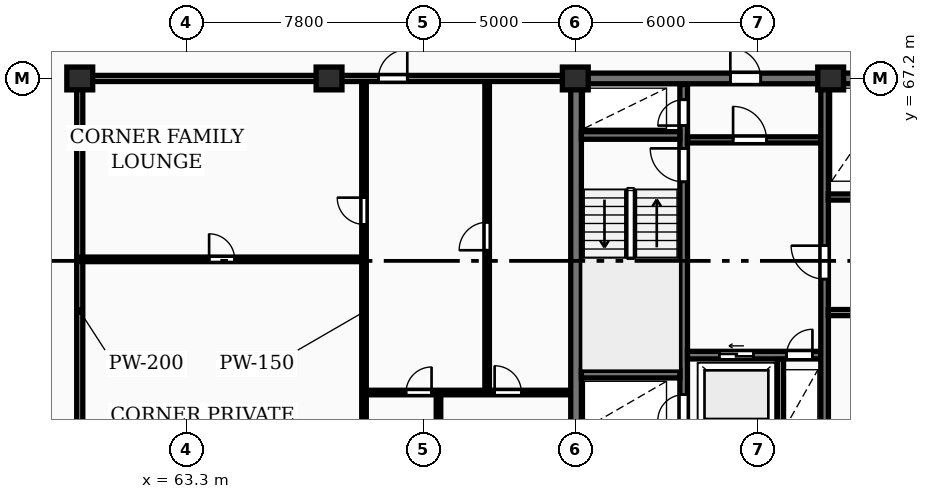
"""IFC4 building model, lengths in metres.
Left out: names, types, materials, properties, quantities, classifications, styles, units other than length and angle.
Written with IfcOpenShell. Run it as: python <this file> out.ifc"""

import sys

from ifc_helpers import new_model, si_unit, direction, frame, frame_2d, origin, origin_2d, place, context, subcontext, project, spatial, rectangle, extrude, element, fill, save


model = new_model("IFC4")
c1 = context("Model", 3, precision=1e-05, world=origin(), true_north=direction((0.0, 1.0)))
c2 = subcontext(c1, "Body", "Model", "MODEL_VIEW")
j1 = project(units=[si_unit("LENGTHUNIT", "METRE"), si_unit("PLANEANGLEUNIT", "RADIAN")], contexts=[c1])
p1 = place(None, origin())
s1 = spatial("IfcSite", under=j1, at=p1, CompositionType="ELEMENT")
p2 = place(p1, origin())
s2 = spatial("IfcBuilding", under=s1, at=p2, CompositionType="ELEMENT")
p3 = place(p2, frame((0.0, 0.0, 207.6)))
s3 = spatial("IfcBuildingStorey", under=s2, at=p3, CompositionType="ELEMENT", Elevation=207.6)
for number, where, z_axis, x_axis in (
    (1, (59.8, 67.2, 0.0), (0.0, 0.0, 1.0), (1.0, 0.0, 0.0)),
    (2, (68.0, 67.2, 0.0), (0.0, 0.0, 1.0), (1.0, 0.0, 0.0)),
    (3, (76.1, 67.2, 0.0), (0.0, 0.0, 1.0), (1.0, 0.0, 0.0)),
    (4, (84.5, 67.2, 0.0), (0.0, 0.0, 1.0), (1.0, 0.0, 0.0)),
):
    element("IfcColumn", number, at=place(p3, frame(where, z_axis=z_axis, x_axis=x_axis)), inside=s3, PredefinedType="COLUMN", context=c2, shape_type="SweptSolid", body=[
        extrude(rectangle(XDim=0.85, YDim=0.75, at=origin_2d()), origin(), (0.0, 0.0, 1.0), 3.25),
    ])
p4 = place(p3, frame((76.125, 55.375, 0.0), z_axis=(0.0, 0.0, 1.0), x_axis=(0.0, 1.0, 0.0)))
e5 = element("IfcWall", 5, at=p4, inside=s3, PredefinedType="SHEAR", context=c2, shape_type="SweptSolid", body=[
    extrude(rectangle(XDim=11.65, YDim=0.35, at=frame_2d((5.825, 0.0))), origin(), (0.0, 0.0, 1.0), 3.25),
])
p5 = place(p3, frame((75.95, 67.2, 0.0), z_axis=(0.0, 0.0, 1.0), x_axis=(1.0, 0.0, 0.0)))
e6 = element("IfcWall", 6, at=p5, inside=s3, PredefinedType="SHEAR", context=c2, shape_type="SweptSolid", body=[
    extrude(rectangle(XDim=36.3, YDim=0.35, at=frame_2d((18.15, 0.0))), origin(), (0.0, 0.0, 1.0), 3.25),
])
p6 = place(p5, frame((5.25, 0.0, 0.0)))
e7 = element("IfcOpeningElement", 7, at=p6, cuts=e6, PredefinedType="OPENING", context=c2, shape_type="SweptSolid", body=[
    extrude(rectangle(XDim=1.0, YDim=2.15, at=frame_2d((0.5, 1.075))), frame((0.0, 0.185, 0.0), z_axis=(0.0, -1.0, 0.0), x_axis=(1.0, 0.0, 0.0)), (0.0, 0.0, 1.0), 0.37),
])
p7 = place(p5, frame((21.6, 0.0, 0.0)))
e8 = element("IfcOpeningElement", 8, at=p7, cuts=e6, PredefinedType="OPENING", context=c2, shape_type="SweptSolid", body=[
    extrude(rectangle(XDim=1.5, YDim=2.2, at=frame_2d((0.75, 1.1))), frame((0.0, 0.185, 0.0), z_axis=(0.0, -1.0, 0.0), x_axis=(1.0, 0.0, 0.0)), (0.0, 0.0, 1.0), 0.37),
])
p8 = place(p5, frame((30.45, 0.0, 0.0)))
e9 = element("IfcOpeningElement", 9, at=p8, cuts=e6, PredefinedType="OPENING", context=c2, shape_type="SweptSolid", body=[
    extrude(rectangle(XDim=1.0, YDim=2.15, at=frame_2d((0.5, 1.075))), frame((0.0, 0.185, 0.0), z_axis=(0.0, -1.0, 0.0), x_axis=(1.0, 0.0, 0.0)), (0.0, 0.0, 1.0), 0.37),
])
p9 = place(p3, frame((79.665, 55.4, 0.0), z_axis=(0.0, 0.0, 1.0), x_axis=(0.0, 1.0, 0.0)))
e10 = element("IfcWall", 10, at=p9, inside=s3, PredefinedType="SHEAR", context=c2, shape_type="SweptSolid", body=[
    extrude(rectangle(XDim=11.6, YDim=0.25, at=frame_2d((5.8, 0.0))), origin(), (0.0, 0.0, 1.0), 3.25),
])
p10 = place(p9, frame((0.55, 0.0, 0.0)))
e11 = element("IfcOpeningElement", 11, at=p10, cuts=e10, PredefinedType="OPENING", context=c2, shape_type="SweptSolid", body=[
    extrude(rectangle(XDim=0.85, YDim=2.05, at=frame_2d((0.425, 1.025))), frame((0.0, 0.135, 0.0), z_axis=(0.0, -1.0, 0.0), x_axis=(1.0, 0.0, 0.0)), (0.0, 0.0, 1.0), 0.27),
])
p11 = place(p9, frame((8.4, 0.0, 0.0)))
e12 = element("IfcOpeningElement", 12, at=p11, cuts=e10, PredefinedType="OPENING", context=c2, shape_type="SweptSolid", body=[
    extrude(rectangle(XDim=1.1, YDim=2.1, at=frame_2d((0.55, 1.05))), frame((0.0, 0.135, 0.0), z_axis=(0.0, -1.0, 0.0), x_axis=(1.0, 0.0, 0.0)), (0.0, 0.0, 1.0), 0.27),
])
p12 = place(p9, frame((10.25, 0.0, 0.0)))
e13 = element("IfcOpeningElement", 13, at=p12, cuts=e10, PredefinedType="OPENING", context=c2, shape_type="SweptSolid", body=[
    extrude(rectangle(XDim=0.85, YDim=2.05, at=frame_2d((0.425, 1.025))), frame((0.0, 0.135, 0.0), z_axis=(0.0, -1.0, 0.0), x_axis=(1.0, 0.0, 0.0)), (0.0, 0.0, 1.0), 0.27),
])
for number, where, z_axis, x_axis in (
    (14, (76.3, 57.475, 0.0), (0.0, 0.0, 1.0), (1.0, 0.0, 0.0)),
    (15, (76.3, 65.325, 0.0), (0.0, 0.0, 1.0), (1.0, 0.0, 0.0)),
):
    element("IfcWall", number, at=place(p3, frame(where, z_axis=z_axis, x_axis=x_axis)), inside=s3, PredefinedType="SHEAR", context=c2, shape_type="SweptSolid", body=[
        extrude(rectangle(XDim=3.24, YDim=0.25, at=frame_2d((1.62, 0.0))), origin(), (0.0, 0.0, 1.0), 3.25),
    ])
p13 = place(p3, frame((79.79, 58.1, 0.0), z_axis=(0.0, 0.0, 1.0), x_axis=(1.0, 0.0, 0.0)))
e16 = element("IfcWall", 16, at=p13, inside=s3, PredefinedType="SHEAR", context=c2, shape_type="SweptSolid", body=[
    extrude(rectangle(XDim=4.39, YDim=0.25, at=frame_2d((2.195, 0.0))), origin(), (0.0, 0.0, 1.0), 3.25),
])
p14 = place(p13, frame((1.05, 0.0, 0.0)))
e17 = element("IfcOpeningElement", 17, at=p14, cuts=e16, PredefinedType="OPENING", context=c2, shape_type="SweptSolid", body=[
    extrude(rectangle(XDim=1.12, YDim=2.12, at=frame_2d((0.56, 1.06))), frame((0.0, 0.135, 0.0), z_axis=(0.0, -1.0, 0.0), x_axis=(1.0, 0.0, 0.0)), (0.0, 0.0, 1.0), 0.27),
])
p15 = place(p13, frame((3.26, 0.0, 0.0)))
e18 = element("IfcOpeningElement", 18, at=p15, cuts=e16, PredefinedType="OPENING", context=c2, shape_type="SweptSolid", body=[
    extrude(rectangle(XDim=0.85, YDim=2.05, at=frame_2d((0.425, 1.025))), frame((0.0, 0.135, 0.0), z_axis=(0.0, -1.0, 0.0), x_axis=(1.0, 0.0, 0.0)), (0.0, 0.0, 1.0), 0.27),
])
p16 = place(p3, frame((82.85, 55.4, 0.0), z_axis=(0.0, 0.0, 1.0), x_axis=(0.0, 1.0, 0.0)))
e19 = element("IfcWall", 19, at=p16, inside=s3, PredefinedType="PARTITIONING", context=c2, shape_type="SweptSolid", body=[
    extrude(rectangle(XDim=2.56, YDim=0.2, at=frame_2d((1.28, 0.0))), origin(), (0.0, 0.0, 1.0), 2.97),
])
p17 = place(p3, frame((79.79, 65.18, 0.0), z_axis=(0.0, 0.0, 1.0), x_axis=(1.0, 0.0, 0.0)))
e20 = element("IfcWall", 20, at=p17, inside=s3, PredefinedType="PARTITIONING", context=c2, shape_type="SweptSolid", body=[
    extrude(rectangle(XDim=4.39, YDim=0.2, at=frame_2d((2.195, 0.0))), origin(), (0.0, 0.0, 1.0), 2.97),
])
p18 = place(p17, frame((1.5, 0.0, 0.0)))
e21 = element("IfcOpeningElement", 21, at=p18, cuts=e20, PredefinedType="OPENING", context=c2, shape_type="SweptSolid", body=[
    extrude(rectangle(XDim=1.1, YDim=2.1, at=frame_2d((0.55, 1.05))), frame((0.0, 0.11, 0.0), z_axis=(0.0, -1.0, 0.0), x_axis=(1.0, 0.0, 0.0)), (0.0, 0.0, 1.0), 0.22),
])
p19 = place(p3, frame((84.3, 55.4, 0.0), z_axis=(0.0, 0.0, 1.0), x_axis=(0.0, 1.0, 0.0)))
e22 = element("IfcWall", 22, at=p19, inside=s3, PredefinedType="SHEAR", context=c2, shape_type="SweptSolid", body=[
    extrude(rectangle(XDim=11.6, YDim=0.25, at=frame_2d((5.8, 0.0))), origin(), (0.0, 0.0, 1.0), 3.25),
])
p20 = place(p19, frame((5.2, 0.0, 0.0)))
e23 = element("IfcOpeningElement", 23, at=p20, cuts=e22, PredefinedType="OPENING", context=c2, shape_type="SweptSolid", body=[
    extrude(rectangle(XDim=1.1, YDim=2.1, at=frame_2d((0.55, 1.05))), frame((0.0, 0.135, 0.0), z_axis=(0.0, -1.0, 0.0), x_axis=(1.0, 0.0, 0.0)), (0.0, 0.0, 1.0), 0.27),
])
p21 = place(p3, frame((84.42, 59.5, 0.0), z_axis=(0.0, 0.0, 1.0), x_axis=(1.0, 0.0, 0.0)))
e24 = element("IfcWall", 24, at=p21, inside=s3, PredefinedType="PARTITIONING", context=c2, shape_type="SweptSolid", body=[
    extrude(rectangle(XDim=8.36, YDim=0.2, at=frame_2d((4.18, 0.0))), origin(), (0.0, 0.0, 1.0), 2.97),
])
p22 = place(p21, frame((3.4, 0.0, 0.0)))
e25 = element("IfcOpeningElement", 25, at=p22, cuts=e24, PredefinedType="OPENING", context=c2, shape_type="SweptSolid", body=[
    extrude(rectangle(XDim=0.92, YDim=2.08, at=frame_2d((0.46, 1.04))), frame((0.0, 0.11, 0.0), z_axis=(0.0, -1.0, 0.0), x_axis=(1.0, 0.0, 0.0)), (0.0, 0.0, 1.0), 0.22),
])
p23 = place(p3, frame((84.42, 63.3, 0.0), z_axis=(0.0, 0.0, 1.0), x_axis=(1.0, 0.0, 0.0)))
e26 = element("IfcWall", 26, at=p23, inside=s3, PredefinedType="PARTITIONING", context=c2, shape_type="SweptSolid", body=[
    extrude(rectangle(XDim=19.83, YDim=0.2, at=frame_2d((9.915, 0.0))), origin(), (0.0, 0.0, 1.0), 2.97),
])
p24 = place(p23, frame((1.15, 0.0, 0.0)))
e27 = element("IfcOpeningElement", 27, at=p24, cuts=e26, PredefinedType="OPENING", context=c2, shape_type="SweptSolid", body=[
    extrude(rectangle(XDim=0.85, YDim=2.05, at=frame_2d((0.425, 1.025))), frame((0.0, 0.11, 0.0), z_axis=(0.0, -1.0, 0.0), x_axis=(1.0, 0.0, 0.0)), (0.0, 0.0, 1.0), 0.22),
])
p25 = place(p23, frame((3.25, 0.0, 0.0)))
e28 = element("IfcOpeningElement", 28, at=p25, cuts=e26, PredefinedType="OPENING", context=c2, shape_type="SweptSolid", body=[
    extrude(rectangle(XDim=0.85, YDim=2.05, at=frame_2d((0.425, 1.025))), frame((0.0, 0.11, 0.0), z_axis=(0.0, -1.0, 0.0), x_axis=(1.0, 0.0, 0.0)), (0.0, 0.0, 1.0), 0.22),
])
p26 = place(p23, frame((13.08, 0.0, 0.0)))
e29 = element("IfcOpeningElement", 29, at=p26, cuts=e26, PredefinedType="OPENING", context=c2, shape_type="SweptSolid", body=[
    extrude(rectangle(XDim=1.5, YDim=2.2, at=frame_2d((0.75, 1.1))), frame((0.0, 0.11, 0.0), z_axis=(0.0, -1.0, 0.0), x_axis=(1.0, 0.0, 0.0)), (0.0, 0.0, 1.0), 0.22),
])
p27 = place(p23, frame((6.78, 0.0, 0.0)))
e30 = element("IfcOpeningElement", 30, at=p27, cuts=e26, PredefinedType="OPENING", context=c2, shape_type="SweptSolid", body=[
    extrude(rectangle(XDim=0.92, YDim=2.08, at=frame_2d((0.46, 1.04))), frame((0.0, 0.11, 0.0), z_axis=(0.0, -1.0, 0.0), x_axis=(1.0, 0.0, 0.0)), (0.0, 0.0, 1.0), 0.22),
])
p28 = place(p23, frame((16.28, 0.0, 0.0)))
e31 = element("IfcOpeningElement", 31, at=p28, cuts=e26, PredefinedType="OPENING", context=c2, shape_type="SweptSolid", body=[
    extrude(rectangle(XDim=0.92, YDim=2.08, at=frame_2d((0.46, 1.04))), frame((0.0, 0.11, 0.0), z_axis=(0.0, -1.0, 0.0), x_axis=(1.0, 0.0, 0.0)), (0.0, 0.0, 1.0), 0.22),
])
p29 = place(p3, frame((59.8, 51.9, 0.0), z_axis=(0.0, 0.0, 1.0), x_axis=(0.0, 1.0, 0.0)))
e32 = element("IfcWall", 32, at=p29, inside=s3, PredefinedType="PARTITIONING", context=c2, shape_type="SweptSolid", body=[
    extrude(rectangle(XDim=15.3, YDim=0.2, at=frame_2d((7.65, 0.0))), origin(), (0.0, 0.0, 1.0), 2.277),
])
p30 = place(p3, frame((59.8, 61.25, 0.0), z_axis=(0.0, 0.0, 1.0), x_axis=(1.0, 0.0, 0.0)))
e33 = element("IfcWall", 33, at=p30, inside=s3, PredefinedType="PARTITIONING", context=c2, shape_type="SweptSolid", body=[
    extrude(rectangle(XDim=9.35, YDim=0.15, at=frame_2d((4.675, 0.0))), origin(), (0.0, 0.0, 1.0), 2.97),
])
p31 = place(p30, frame((4.255, 0.0, 0.0)))
e34 = element("IfcOpeningElement", 34, at=p31, cuts=e33, PredefinedType="OPENING", context=c2, shape_type="SweptSolid", body=[
    extrude(rectangle(XDim=0.84, YDim=2.04, at=frame_2d((0.42, 1.02))), frame((0.0, 0.085, 0.0), z_axis=(0.0, -1.0, 0.0), x_axis=(1.0, 0.0, 0.0)), (0.0, 0.0, 1.0), 0.17),
])
p32 = place(p3, frame((69.15, 51.9, 0.0), z_axis=(0.0, 0.0, 1.0), x_axis=(0.0, 1.0, 0.0)))
e35 = element("IfcWall", 35, at=p32, inside=s3, PredefinedType="PARTITIONING", context=c2, shape_type="SweptSolid", body=[
    extrude(rectangle(XDim=15.25, YDim=0.15, at=frame_2d((7.625, 0.0))), origin(), (0.0, 0.0, 1.0), 2.97),
])
p33 = place(p32, frame((10.5, 0.0, 0.0)))
e36 = element("IfcOpeningElement", 36, at=p33, cuts=e35, PredefinedType="OPENING", context=c2, shape_type="SweptSolid", body=[
    extrude(rectangle(XDim=0.88, YDim=2.06, at=frame_2d((0.44, 1.03))), frame((0.0, 0.085, 0.0), z_axis=(0.0, -1.0, 0.0), x_axis=(1.0, 0.0, 0.0)), (0.0, 0.0, 1.0), 0.17),
])
p34 = place(p3, frame((73.2, 56.87, 0.0), z_axis=(0.0, 0.0, 1.0), x_axis=(0.0, 1.0, 0.0)))
e37 = element("IfcWall", 37, at=p34, inside=s3, PredefinedType="PARTITIONING", context=c2, shape_type="SweptSolid", body=[
    extrude(rectangle(XDim=10.28, YDim=0.15, at=frame_2d((5.14, 0.0))), origin(), (0.0, 0.0, 1.0), 2.97),
])
p35 = place(p34, frame((4.68, 0.0, 0.0)))
e38 = element("IfcOpeningElement", 38, at=p35, cuts=e37, PredefinedType="OPENING", context=c2, shape_type="SweptSolid", body=[
    extrude(rectangle(XDim=0.92, YDim=2.08, at=frame_2d((0.46, 1.04))), frame((0.0, 0.085, 0.0), z_axis=(0.0, -1.0, 0.0), x_axis=(1.0, 0.0, 0.0)), (0.0, 0.0, 1.0), 0.17),
])
p36 = place(p3, frame((71.6, 51.9, 0.0), z_axis=(0.0, 0.0, 1.0), x_axis=(0.0, 1.0, 0.0)))
e39 = element("IfcWall", 39, at=p36, inside=s3, PredefinedType="PARTITIONING", context=c2, shape_type="SweptSolid", body=[
    extrude(rectangle(XDim=4.97, YDim=0.15, at=frame_2d((2.485, 0.0))), origin(), (0.0, 0.0, 1.0), 2.97),
])
p37 = place(p3, frame((69.17, 56.87, 0.0), z_axis=(0.0, 0.0, 1.0), x_axis=(1.0, 0.0, 0.0)))
e40 = element("IfcWall", 40, at=p37, inside=s3, PredefinedType="PARTITIONING", context=c2, shape_type="SweptSolid", body=[
    extrude(rectangle(XDim=6.76, YDim=0.15, at=frame_2d((3.38, 0.0))), origin(), (0.0, 0.0, 1.0), 2.97),
])
p38 = place(p37, frame((1.362, 0.0, 0.0)))
e41 = element("IfcOpeningElement", 41, at=p38, cuts=e40, PredefinedType="OPENING", context=c2, shape_type="SweptSolid", body=[
    extrude(rectangle(XDim=0.84, YDim=2.04, at=frame_2d((0.42, 1.02))), frame((0.0, 0.085, 0.0), z_axis=(0.0, -1.0, 0.0), x_axis=(1.0, 0.0, 0.0)), (0.0, 0.0, 1.0), 0.17),
])
p39 = place(p37, frame((4.277, 0.0, 0.0)))
e42 = element("IfcOpeningElement", 42, at=p39, cuts=e40, PredefinedType="OPENING", context=c2, shape_type="SweptSolid", body=[
    extrude(rectangle(XDim=0.88, YDim=2.06, at=frame_2d((0.44, 1.03))), frame((0.0, 0.085, 0.0), z_axis=(0.0, -1.0, 0.0), x_axis=(1.0, 0.0, 0.0)), (0.0, 0.0, 1.0), 0.17),
])
p40 = place(p3, frame((59.8, 67.2, 0.0), z_axis=(0.0, 0.0, 1.0), x_axis=(1.0, 0.0, 0.0)))
e43 = element("IfcWall", 43, at=p40, inside=s3, PredefinedType="PARTITIONING", context=c2, shape_type="SweptSolid", body=[
    extrude(rectangle(XDim=16.15, YDim=0.2, at=frame_2d((8.075, 0.0))), origin(), (0.0, 0.0, 1.0), 2.433),
])
p41 = place(p40, frame((9.823, 0.0, 0.0)))
e44 = element("IfcOpeningElement", 44, at=p41, cuts=e43, PredefinedType="OPENING", context=c2, shape_type="SweptSolid", body=[
    extrude(rectangle(XDim=0.95, YDim=2.15, at=frame_2d((0.475, 1.075))), frame((0.0, 0.11, 0.0), z_axis=(0.0, -1.0, 0.0), x_axis=(1.0, 0.0, 0.0)), (0.0, 0.0, 1.0), 0.22),
])
p42 = place(p6, origin())
e45 = element("IfcDoor", 45, at=p42, inside=s3, OperationType="SINGLE_SWING_LEFT", PredefinedType="DOOR", context=c2, shape_type="SweptSolid", body=[
    extrude(rectangle(XDim=1.0, YDim=2.15, at=frame_2d((0.5, 1.075))), frame((0.0, 0.025, 0.0), z_axis=(0.0, -1.0, 0.0), x_axis=(1.0, 0.0, 0.0)), (0.0, 0.0, 1.0), 0.05),
])
fill(e7, e45)
p43 = place(p10, origin())
e46 = element("IfcDoor", 46, at=p43, inside=s3, OperationType="SINGLE_SWING_LEFT", PredefinedType="DOOR", context=c2, shape_type="SweptSolid", body=[
    extrude(rectangle(XDim=0.85, YDim=2.05, at=frame_2d((0.425, 1.025))), frame((0.0, 0.025, 0.0), z_axis=(0.0, -1.0, 0.0), x_axis=(1.0, 0.0, 0.0)), (0.0, 0.0, 1.0), 0.05),
])
fill(e11, e46)
p44 = place(p11, origin())
e47 = element("IfcDoor", 47, at=p44, inside=s3, OperationType="SINGLE_SWING_RIGHT", PredefinedType="DOOR", context=c2, shape_type="SweptSolid", body=[
    extrude(rectangle(XDim=1.1, YDim=2.1, at=frame_2d((0.55, 1.05))), frame((0.0, 0.025, 0.0), z_axis=(0.0, -1.0, 0.0), x_axis=(1.0, 0.0, 0.0)), (0.0, 0.0, 1.0), 0.05),
])
fill(e12, e47)
p45 = place(p12, origin())
e48 = element("IfcDoor", 48, at=p45, inside=s3, OperationType="SINGLE_SWING_LEFT", PredefinedType="DOOR", context=c2, shape_type="SweptSolid", body=[
    extrude(rectangle(XDim=0.85, YDim=2.05, at=frame_2d((0.425, 1.025))), frame((0.0, 0.025, 0.0), z_axis=(0.0, -1.0, 0.0), x_axis=(1.0, 0.0, 0.0)), (0.0, 0.0, 1.0), 0.05),
])
fill(e13, e48)
p46 = place(p14, origin())
e49 = element("IfcDoor", 49, at=p46, inside=s3, OperationType="SLIDING_TO_LEFT", PredefinedType="DOOR", context=c2, shape_type="SweptSolid", body=[
    extrude(rectangle(XDim=1.12, YDim=2.12, at=frame_2d((0.56, 1.06))), frame((0.0, 0.025, 0.0), z_axis=(0.0, -1.0, 0.0), x_axis=(1.0, 0.0, 0.0)), (0.0, 0.0, 1.0), 0.05),
])
fill(e17, e49)
p47 = place(p15, origin())
e50 = element("IfcDoor", 50, at=p47, inside=s3, OperationType="SINGLE_SWING_RIGHT", PredefinedType="DOOR", context=c2, shape_type="SweptSolid", body=[
    extrude(rectangle(XDim=0.85, YDim=2.05, at=frame_2d((0.425, 1.025))), frame((0.0, 0.025, 0.0), z_axis=(0.0, -1.0, 0.0), x_axis=(1.0, 0.0, 0.0)), (0.0, 0.0, 1.0), 0.05),
])
fill(e18, e50)
p48 = place(p18, origin())
e51 = element("IfcDoor", 51, at=p48, inside=s3, OperationType="SINGLE_SWING_LEFT", PredefinedType="DOOR", context=c2, shape_type="SweptSolid", body=[
    extrude(rectangle(XDim=1.1, YDim=2.1, at=frame_2d((0.55, 1.05))), frame((0.0, 0.025, 0.0), z_axis=(0.0, -1.0, 0.0), x_axis=(1.0, 0.0, 0.0)), (0.0, 0.0, 1.0), 0.05),
])
fill(e21, e51)
p49 = place(p20, origin())
e52 = element("IfcDoor", 52, at=p49, inside=s3, OperationType="SINGLE_SWING_RIGHT", PredefinedType="DOOR", context=c2, shape_type="SweptSolid", body=[
    extrude(rectangle(XDim=1.1, YDim=2.1, at=frame_2d((0.55, 1.05))), frame((0.0, 0.025, 0.0), z_axis=(0.0, -1.0, 0.0), x_axis=(1.0, 0.0, 0.0)), (0.0, 0.0, 1.0), 0.05),
])
fill(e23, e52)
p50 = place(p31, origin())
e53 = element("IfcDoor", 53, at=p50, inside=s3, OperationType="SINGLE_SWING_LEFT", PredefinedType="DOOR", context=c2, shape_type="SweptSolid", body=[
    extrude(rectangle(XDim=0.84, YDim=2.04, at=frame_2d((0.42, 1.02))), frame((0.0, 0.025, 0.0), z_axis=(0.0, -1.0, 0.0), x_axis=(1.0, 0.0, 0.0)), (0.0, 0.0, 1.0), 0.05),
])
fill(e34, e53)
p51 = place(p33, origin())
e54 = element("IfcDoor", 54, at=p51, inside=s3, OperationType="SINGLE_SWING_RIGHT", PredefinedType="DOOR", context=c2, shape_type="SweptSolid", body=[
    extrude(rectangle(XDim=0.88, YDim=2.06, at=frame_2d((0.44, 1.03))), frame((0.0, 0.025, 0.0), z_axis=(0.0, -1.0, 0.0), x_axis=(1.0, 0.0, 0.0)), (0.0, 0.0, 1.0), 0.05),
])
fill(e36, e54)
p52 = place(p35, origin())
e55 = element("IfcDoor", 55, at=p52, inside=s3, OperationType="SINGLE_SWING_LEFT", PredefinedType="DOOR", context=c2, shape_type="SweptSolid", body=[
    extrude(rectangle(XDim=0.92, YDim=2.08, at=frame_2d((0.46, 1.04))), frame((0.0, 0.025, 0.0), z_axis=(0.0, -1.0, 0.0), x_axis=(1.0, 0.0, 0.0)), (0.0, 0.0, 1.0), 0.05),
])
fill(e38, e55)
p53 = place(p38, origin())
e56 = element("IfcDoor", 56, at=p53, inside=s3, OperationType="SINGLE_SWING_RIGHT", PredefinedType="DOOR", context=c2, shape_type="SweptSolid", body=[
    extrude(rectangle(XDim=0.84, YDim=2.04, at=frame_2d((0.42, 1.02))), frame((0.0, 0.025, 0.0), z_axis=(0.0, -1.0, 0.0), x_axis=(1.0, 0.0, 0.0)), (0.0, 0.0, 1.0), 0.05),
])
fill(e41, e56)
p54 = place(p39, origin())
e57 = element("IfcDoor", 57, at=p54, inside=s3, OperationType="SINGLE_SWING_LEFT", PredefinedType="DOOR", context=c2, shape_type="SweptSolid", body=[
    extrude(rectangle(XDim=0.88, YDim=2.06, at=frame_2d((0.44, 1.03))), frame((0.0, 0.025, 0.0), z_axis=(0.0, -1.0, 0.0), x_axis=(1.0, 0.0, 0.0)), (0.0, 0.0, 1.0), 0.05),
])
fill(e42, e57)
p55 = place(p41, origin())
e58 = element("IfcDoor", 58, at=p55, inside=s3, OperationType="SINGLE_SWING_RIGHT", PredefinedType="DOOR", context=c2, shape_type="SweptSolid", body=[
    extrude(rectangle(XDim=0.95, YDim=2.15, at=frame_2d((0.475, 1.075))), frame((0.0, 0.025, 0.0), z_axis=(0.0, -1.0, 0.0), x_axis=(1.0, 0.0, 0.0)), (0.0, 0.0, 1.0), 0.05),
])
fill(e44, e58)
save(model, sys.argv[1])
